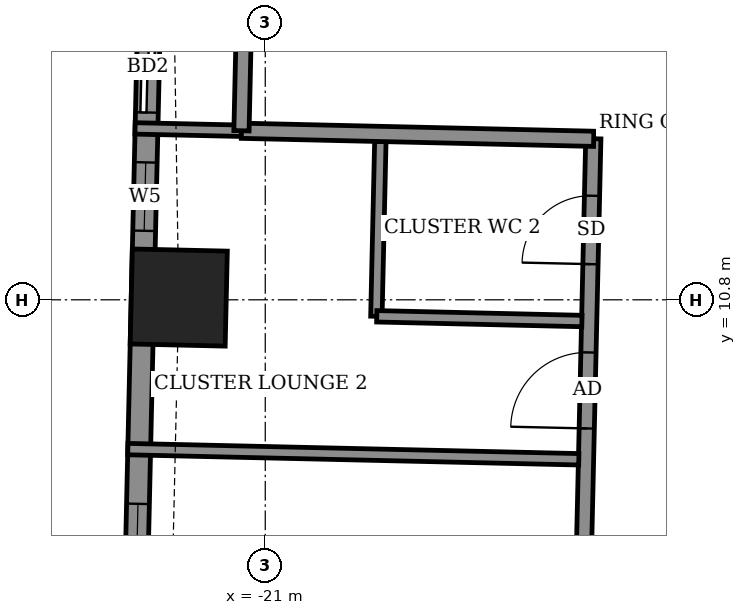
"""IFC4 building model, lengths in metres.
Left out: names, types, materials, properties, quantities, classifications, styles, units other than length and angle.
Written with IfcOpenShell. Run it as: python <this file> out.ifc"""

import sys

from ifc_helpers import new_model, si_unit, direction, frame, frame_2d, origin, origin_2d, place, context, subcontext, project, spatial, rectangle, extrude, element, fill, save


model = new_model("IFC4")
c1 = context("Model", 3, precision=1e-05, world=origin(), true_north=direction((0.0, 1.0)))
c2 = subcontext(c1, "Body", "Model", "MODEL_VIEW")
j1 = project(units=[si_unit("LENGTHUNIT", "METRE"), si_unit("PLANEANGLEUNIT", "RADIAN")], contexts=[c1])
p1 = place(None, origin())
s1 = spatial("IfcSite", under=j1, at=p1, CompositionType="ELEMENT")
p2 = place(p1, origin())
s2 = spatial("IfcBuilding", under=s1, at=p2, CompositionType="ELEMENT")
p3 = place(p2, frame((0.0, 0.0, 156.3)))
s3 = spatial("IfcBuildingStorey", under=s2, at=p3, CompositionType="ELEMENT", Elevation=156.3)
p4 = place(p3, frame((-22.138, 10.83, -0.55), z_axis=(0.0, 0.0, 1.0), x_axis=(-0.022716926728, -0.999741937322, 0.0)))
e1 = element("IfcColumn", 1, at=p4, inside=s3, PredefinedType="COLUMN", context=c2, shape_type="SweptSolid", body=[
    extrude(rectangle(XDim=1.25, YDim=1.25, at=origin_2d()), origin(), (0.0, 0.0, 1.0), 3.6),
])
p5 = place(p3, frame((-22.501, 15.751, 0.0), z_axis=(0.0, 0.0, 1.0), x_axis=(-0.022737995473, -0.999741458359, 0.0)))
e2 = element("IfcWall", 2, at=p5, inside=s3, PredefinedType="SOLIDWALL", context=c2, shape_type="SweptSolid", body=[
    extrude(rectangle(XDim=10.029, YDim=0.3, at=frame_2d((5.014, 0.0))), origin(), (0.0, 0.0, 1.0), 3.05),
])
p6 = place(p5, frame((1.287, 0.0, 0.0)))
e3 = element("IfcOpeningElement", 3, at=p6, cuts=e2, PredefinedType="OPENING", context=c2, shape_type="SweptSolid", body=[
    extrude(rectangle(XDim=1.2, YDim=2.4, at=frame_2d((0.6, 1.2))), frame((0.0, 0.16, 0.0), z_axis=(0.0, -1.0, 0.0), x_axis=(1.0, 0.0, 0.0)), (0.0, 0.0, 1.0), 0.32),
])
p7 = place(p5, frame((3.144, 0.0, 0.9)))
e4 = element("IfcOpeningElement", 4, at=p7, cuts=e2, PredefinedType="OPENING", context=c2, shape_type="SweptSolid", body=[
    extrude(rectangle(XDim=0.9, YDim=1.5, at=frame_2d((0.45, 0.75))), frame((0.0, 0.16, 0.0), z_axis=(0.0, -1.0, 0.0), x_axis=(1.0, 0.0, 0.0)), (0.0, 0.0, 1.0), 0.32),
])
p8 = place(p5, frame((7.637, 0.0, 0.9)))
e5 = element("IfcOpeningElement", 5, at=p8, cuts=e2, PredefinedType="OPENING", context=c2, shape_type="SweptSolid", body=[
    extrude(rectangle(XDim=1.2, YDim=1.5, at=frame_2d((0.6, 0.75))), frame((0.0, 0.16, 0.0), z_axis=(0.0, -1.0, 0.0), x_axis=(1.0, 0.0, 0.0)), (0.0, 0.0, 1.0), 0.32),
])
p9 = place(p3, frame((-17.32, -15.098, 0.0), z_axis=(0.0, 0.0, 1.0), x_axis=(0.022694293906, 0.999742451346, 0.0)))
e6 = element("IfcWall", 6, at=p9, inside=s3, PredefinedType="PARTITIONING", context=c2, shape_type="SweptSolid", body=[
    extrude(rectangle(XDim=28.024, YDim=0.2, at=frame_2d((14.012, 0.0))), origin(), (0.0, 0.0, 1.0), 3.05),
])
p10 = place(p9, frame((24.212, 0.0, 0.0)))
e7 = element("IfcOpeningElement", 7, at=p10, cuts=e6, PredefinedType="OPENING", context=c2, shape_type="SweptSolid", body=[
    extrude(rectangle(XDim=1.0, YDim=2.1, at=frame_2d((0.5, 1.05))), frame((0.0, 0.11, 0.0), z_axis=(0.0, -1.0, 0.0), x_axis=(1.0, 0.0, 0.0)), (0.0, 0.0, 1.0), 0.22),
])
p11 = place(p9, frame((26.374, 0.0, 0.0)))
e8 = element("IfcOpeningElement", 8, at=p11, cuts=e6, PredefinedType="OPENING", context=c2, shape_type="SweptSolid", body=[
    extrude(rectangle(XDim=0.9, YDim=2.1, at=frame_2d((0.45, 1.05))), frame((0.0, 0.11, 0.0), z_axis=(0.0, -1.0, 0.0), x_axis=(1.0, 0.0, 0.0)), (0.0, 0.0, 1.0), 0.22),
])
p12 = place(p9, frame((21.774, 0.0, 0.0)))
e9 = element("IfcOpeningElement", 9, at=p12, cuts=e6, PredefinedType="OPENING", context=c2, shape_type="SweptSolid", body=[
    extrude(rectangle(XDim=1.0, YDim=2.1, at=frame_2d((0.5, 1.05))), frame((0.0, 0.11, 0.0), z_axis=(0.0, -1.0, 0.0), x_axis=(1.0, 0.0, 0.0)), (0.0, 0.0, 1.0), 0.22),
])
p13 = place(p9, frame((18.65, 0.0, 0.0)))
e10 = element("IfcOpeningElement", 10, at=p13, cuts=e6, PredefinedType="OPENING", context=c2, shape_type="SweptSolid", body=[
    extrude(rectangle(XDim=1.0, YDim=2.1, at=frame_2d((0.5, 1.05))), frame((0.0, 0.11, 0.0), z_axis=(0.0, -1.0, 0.0), x_axis=(1.0, 0.0, 0.0)), (0.0, 0.0, 1.0), 0.22),
])
p14 = place(p9, frame((15.626, 0.0, 0.0)))
e11 = element("IfcOpeningElement", 11, at=p14, cuts=e6, PredefinedType="OPENING", context=c2, shape_type="SweptSolid", body=[
    extrude(rectangle(XDim=1.0, YDim=2.1, at=frame_2d((0.5, 1.05))), frame((0.0, 0.11, 0.0), z_axis=(0.0, -1.0, 0.0), x_axis=(1.0, 0.0, 0.0)), (0.0, 0.0, 1.0), 0.22),
])
p15 = place(p9, frame((12.557, 0.0, 0.0)))
e12 = element("IfcOpeningElement", 12, at=p15, cuts=e6, PredefinedType="OPENING", context=c2, shape_type="SweptSolid", body=[
    extrude(rectangle(XDim=1.0, YDim=2.1, at=frame_2d((0.5, 1.05))), frame((0.0, 0.11, 0.0), z_axis=(0.0, -1.0, 0.0), x_axis=(1.0, 0.0, 0.0)), (0.0, 0.0, 1.0), 0.22),
])
p16 = place(p9, frame((10.049, 0.0, 0.0)))
e13 = element("IfcOpeningElement", 13, at=p16, cuts=e6, PredefinedType="OPENING", context=c2, shape_type="SweptSolid", body=[
    extrude(rectangle(XDim=1.0, YDim=2.1, at=frame_2d((0.5, 1.05))), frame((0.0, 0.11, 0.0), z_axis=(0.0, -1.0, 0.0), x_axis=(1.0, 0.0, 0.0)), (0.0, 0.0, 1.0), 0.22),
])
p17 = place(p9, frame((7.849, 0.0, 0.0)))
e14 = element("IfcOpeningElement", 14, at=p17, cuts=e6, PredefinedType="OPENING", context=c2, shape_type="SweptSolid", body=[
    extrude(rectangle(XDim=0.9, YDim=2.1, at=frame_2d((0.45, 1.05))), frame((0.0, 0.11, 0.0), z_axis=(0.0, -1.0, 0.0), x_axis=(1.0, 0.0, 0.0)), (0.0, 0.0, 1.0), 0.22),
])
p18 = place(p9, frame((4.199, 0.0, 0.0)))
e15 = element("IfcOpeningElement", 15, at=p18, cuts=e6, PredefinedType="OPENING", context=c2, shape_type="SweptSolid", body=[
    extrude(rectangle(XDim=1.0, YDim=2.1, at=frame_2d((0.5, 1.05))), frame((0.0, 0.11, 0.0), z_axis=(0.0, -1.0, 0.0), x_axis=(1.0, 0.0, 0.0)), (0.0, 0.0, 1.0), 0.22),
])
p19 = place(p9, frame((0.75, 0.0, 0.0)))
e16 = element("IfcOpeningElement", 16, at=p19, cuts=e6, PredefinedType="OPENING", context=c2, shape_type="SweptSolid", body=[
    extrude(rectangle(XDim=0.9, YDim=2.1, at=frame_2d((0.45, 1.05))), frame((0.0, 0.11, 0.0), z_axis=(0.0, -1.0, 0.0), x_axis=(1.0, 0.0, 0.0)), (0.0, 0.0, 1.0), 0.22),
])
p20 = place(p3, frame((-22.808, 8.836, 0.0), z_axis=(0.0, 0.0, 1.0), x_axis=(0.999744927012, -0.022584970987, 0.0)))
e17 = element("IfcWall", 17, at=p20, inside=s3, PredefinedType="PARTITIONING", context=c2, shape_type="SweptSolid", body=[
    extrude(rectangle(XDim=5.935, YDim=0.15, at=frame_2d((2.967, 0.0))), origin(), (0.0, 0.0, 1.0), 2.55),
])
p21 = place(p3, frame((-19.538, 10.583, 0.0), z_axis=(0.0, 0.0, 1.0), x_axis=(0.022612884682, 0.999744296031, 0.0)))
e18 = element("IfcWall", 18, at=p21, inside=s3, PredefinedType="PARTITIONING", context=c2, shape_type="SweptSolid", body=[
    extrude(rectangle(XDim=2.3, YDim=0.15, at=frame_2d((1.15, 0.0))), origin(), (0.0, 0.0, 1.0), 3.05),
])
p22 = place(p3, frame((-19.533, 10.583, 0.0), z_axis=(0.0, 0.0, 1.0), x_axis=(0.999736155505, -0.022969966847, 0.0)))
e19 = element("IfcWall", 19, at=p22, inside=s3, PredefinedType="PARTITIONING", context=c2, shape_type="SweptSolid", body=[
    extrude(rectangle(XDim=2.7, YDim=0.15, at=frame_2d((1.35, 0.0))), origin(), (0.0, 0.0, 1.0), 3.05),
])
p23 = place(p3, frame((-22.713, 13.055, 0.0), z_axis=(0.0, 0.0, 1.0), x_axis=(0.999756172383, -0.022081571112, 0.0)))
e20 = element("IfcWall", 20, at=p23, inside=s3, PredefinedType="PARTITIONING", context=c2, shape_type="SweptSolid", body=[
    extrude(rectangle(XDim=1.404, YDim=0.15, at=frame_2d((0.702, 0.0))), origin(), (0.0, 0.0, 1.0), 2.55),
])
p24 = place(p3, frame((-21.313, 13.024, 0.0), z_axis=(0.0, 0.0, 1.0), x_axis=(0.999738699021, -0.022858995594, 0.0)))
e21 = element("IfcWall", 21, at=p24, inside=s3, PredefinedType="PARTITIONING", context=c2, shape_type="SweptSolid", body=[
    extrude(rectangle(XDim=4.635, YDim=0.2, at=frame_2d((2.318, 0.0))), origin(), (0.0, 0.0, 1.0), 3.05),
])
p25 = place(p3, frame((-21.313, 13.024, 0.0), z_axis=(0.0, 0.0, 1.0), x_axis=(0.022632637625, 0.99974384905, 0.0)))
e22 = element("IfcWall", 22, at=p25, inside=s3, PredefinedType="PARTITIONING", context=c2, shape_type="SweptSolid", body=[
    extrude(rectangle(XDim=1.5, YDim=0.2, at=frame_2d((0.75, 0.0))), origin(), (0.0, 0.0, 1.0), 3.05),
])
p26 = place(p3, frame((-21.279, 14.523, 0.0), z_axis=(0.0, 0.0, 1.0), x_axis=(0.999742669174, -0.02268469602, 0.0)))
e23 = element("IfcWall", 23, at=p26, inside=s3, PredefinedType="PARTITIONING", context=c2, shape_type="SweptSolid", body=[
    extrude(rectangle(XDim=40.639, YDim=0.2, at=frame_2d((20.319, 0.0))), origin(), (0.0, 0.0, 1.0), 3.05),
])
p27 = place(p26, frame((37.65, 0.0, 0.0)))
e24 = element("IfcOpeningElement", 24, at=p27, cuts=e23, PredefinedType="OPENING", context=c2, shape_type="SweptSolid", body=[
    extrude(rectangle(XDim=0.9, YDim=2.1, at=frame_2d((0.45, 1.05))), frame((0.0, 0.11, 0.0), z_axis=(0.0, -1.0, 0.0), x_axis=(1.0, 0.0, 0.0)), (0.0, 0.0, 1.0), 0.22),
])
p28 = place(p26, frame((32.775, 0.0, 0.0)))
e25 = element("IfcOpeningElement", 25, at=p28, cuts=e23, PredefinedType="OPENING", context=c2, shape_type="SweptSolid", body=[
    extrude(rectangle(XDim=0.9, YDim=2.1, at=frame_2d((0.45, 1.05))), frame((0.0, 0.11, 0.0), z_axis=(0.0, -1.0, 0.0), x_axis=(1.0, 0.0, 0.0)), (0.0, 0.0, 1.0), 0.22),
])
p29 = place(p26, frame((30.4, 0.0, 0.0)))
e26 = element("IfcOpeningElement", 26, at=p29, cuts=e23, PredefinedType="OPENING", context=c2, shape_type="SweptSolid", body=[
    extrude(rectangle(XDim=0.9, YDim=2.1, at=frame_2d((0.45, 1.05))), frame((0.0, 0.11, 0.0), z_axis=(0.0, -1.0, 0.0), x_axis=(1.0, 0.0, 0.0)), (0.0, 0.0, 1.0), 0.22),
])
p30 = place(p26, frame((23.225, 0.0, 0.0)))
e27 = element("IfcOpeningElement", 27, at=p30, cuts=e23, PredefinedType="OPENING", context=c2, shape_type="SweptSolid", body=[
    extrude(rectangle(XDim=0.9, YDim=2.1, at=frame_2d((0.45, 1.05))), frame((0.0, 0.11, 0.0), z_axis=(0.0, -1.0, 0.0), x_axis=(1.0, 0.0, 0.0)), (0.0, 0.0, 1.0), 0.22),
])
p31 = place(p26, frame((20.85, 0.0, 0.0)))
e28 = element("IfcOpeningElement", 28, at=p31, cuts=e23, PredefinedType="OPENING", context=c2, shape_type="SweptSolid", body=[
    extrude(rectangle(XDim=0.9, YDim=2.1, at=frame_2d((0.45, 1.05))), frame((0.0, 0.11, 0.0), z_axis=(0.0, -1.0, 0.0), x_axis=(1.0, 0.0, 0.0)), (0.0, 0.0, 1.0), 0.22),
])
p32 = place(p26, frame((13.675, 0.0, 0.0)))
e29 = element("IfcOpeningElement", 29, at=p32, cuts=e23, PredefinedType="OPENING", context=c2, shape_type="SweptSolid", body=[
    extrude(rectangle(XDim=0.9, YDim=2.1, at=frame_2d((0.45, 1.05))), frame((0.0, 0.11, 0.0), z_axis=(0.0, -1.0, 0.0), x_axis=(1.0, 0.0, 0.0)), (0.0, 0.0, 1.0), 0.22),
])
p33 = place(p26, frame((11.325, 0.0, 0.0)))
e30 = element("IfcOpeningElement", 30, at=p33, cuts=e23, PredefinedType="OPENING", context=c2, shape_type="SweptSolid", body=[
    extrude(rectangle(XDim=0.9, YDim=2.1, at=frame_2d((0.45, 1.05))), frame((0.0, 0.11, 0.0), z_axis=(0.0, -1.0, 0.0), x_axis=(1.0, 0.0, 0.0)), (0.0, 0.0, 1.0), 0.22),
])
p34 = place(p26, frame((1.6, 0.0, 0.0)))
e31 = element("IfcOpeningElement", 31, at=p34, cuts=e23, PredefinedType="OPENING", context=c2, shape_type="SweptSolid", body=[
    extrude(rectangle(XDim=1.0, YDim=2.1, at=frame_2d((0.5, 1.05))), frame((0.0, 0.11, 0.0), z_axis=(0.0, -1.0, 0.0), x_axis=(1.0, 0.0, 0.0)), (0.0, 0.0, 1.0), 0.22),
])
p35 = place(p26, frame((6.55, 0.0, 0.0)))
e32 = element("IfcOpeningElement", 32, at=p35, cuts=e23, PredefinedType="OPENING", context=c2, shape_type="SweptSolid", body=[
    extrude(rectangle(XDim=0.9, YDim=2.1, at=frame_2d((0.45, 1.05))), frame((0.0, 0.11, 0.0), z_axis=(0.0, -1.0, 0.0), x_axis=(1.0, 0.0, 0.0)), (0.0, 0.0, 1.0), 0.22),
])
p36 = place(p6, origin())
e33 = element("IfcDoor", 33, at=p36, inside=s3, OperationType="SLIDING_TO_LEFT", PredefinedType="DOOR", context=c2, shape_type="SweptSolid", body=[
    extrude(rectangle(XDim=1.2, YDim=2.4, at=frame_2d((0.6, 1.2))), frame((0.0, 0.025, 0.0), z_axis=(0.0, -1.0, 0.0), x_axis=(1.0, 0.0, 0.0)), (0.0, 0.0, 1.0), 0.05),
])
fill(e3, e33)
p37 = place(p7, origin())
e34 = element("IfcWindow", 34, at=p37, inside=s3, PartitioningType="SINGLE_PANEL", PredefinedType="WINDOW", context=c2, shape_type="SweptSolid", body=[
    extrude(rectangle(XDim=0.9, YDim=1.5, at=frame_2d((0.45, 0.75))), frame((0.0, 0.03, 0.0), z_axis=(0.0, -1.0, 0.0), x_axis=(1.0, 0.0, 0.0)), (0.0, 0.0, 1.0), 0.06),
])
fill(e4, e34)
p38 = place(p8, origin())
e35 = element("IfcWindow", 35, at=p38, inside=s3, PartitioningType="SINGLE_PANEL", PredefinedType="WINDOW", context=c2, shape_type="SweptSolid", body=[
    extrude(rectangle(XDim=1.2, YDim=1.5, at=frame_2d((0.6, 0.75))), frame((0.0, 0.03, 0.0), z_axis=(0.0, -1.0, 0.0), x_axis=(1.0, 0.0, 0.0)), (0.0, 0.0, 1.0), 0.06),
])
fill(e5, e35)
p39 = place(p10, origin())
e36 = element("IfcDoor", 36, at=p39, inside=s3, OperationType="SINGLE_SWING_LEFT", PredefinedType="DOOR", context=c2, shape_type="SweptSolid", body=[
    extrude(rectangle(XDim=1.0, YDim=2.1, at=frame_2d((0.5, 1.05))), frame((0.0, 0.025, 0.0), z_axis=(0.0, -1.0, 0.0), x_axis=(1.0, 0.0, 0.0)), (0.0, 0.0, 1.0), 0.05),
])
fill(e7, e36)
p40 = place(p11, origin())
e37 = element("IfcDoor", 37, at=p40, inside=s3, OperationType="SINGLE_SWING_LEFT", PredefinedType="DOOR", context=c2, shape_type="SweptSolid", body=[
    extrude(rectangle(XDim=0.9, YDim=2.1, at=frame_2d((0.45, 1.05))), frame((0.0, 0.025, 0.0), z_axis=(0.0, -1.0, 0.0), x_axis=(1.0, 0.0, 0.0)), (0.0, 0.0, 1.0), 0.05),
])
fill(e8, e37)
save(model, sys.argv[1])
